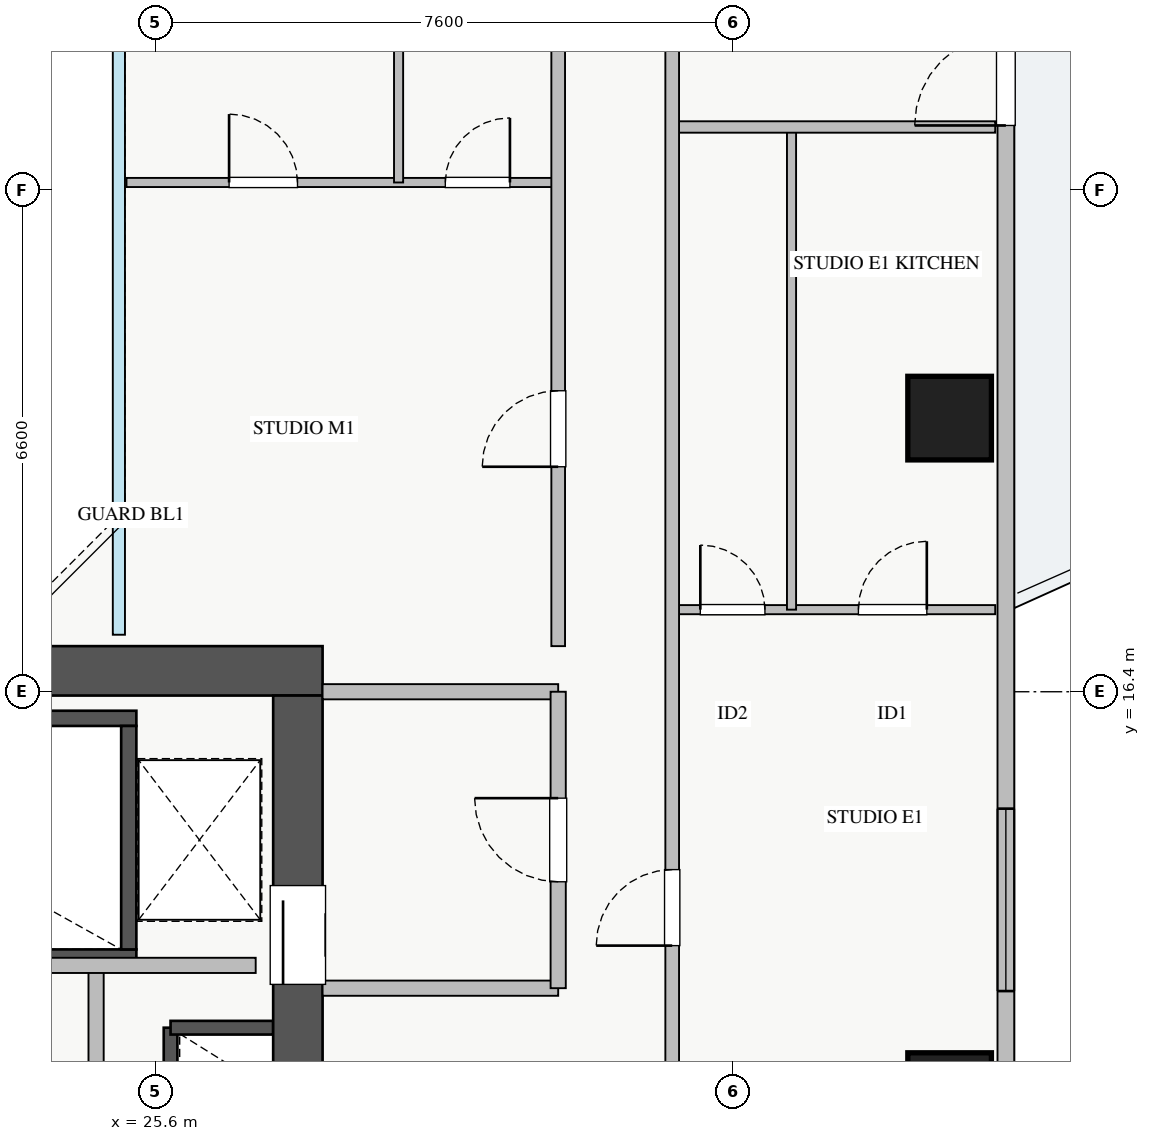
"""IFC4 building model, lengths in metres.
Left out: names, types, materials, properties, quantities, classifications, styles, units other than length and angle.
Written with IfcOpenShell. Run it as: python <this file> out.ifc"""

import sys

from ifc_helpers import new_model, si_unit, direction, frame, frame_2d, origin, origin_2d, place, context, subcontext, project, spatial, rectangle, extrude, source, transform, mapped, element, fill, save


model = new_model("IFC4")
c1 = context("Model", 3, precision=1e-05, world=origin(), true_north=direction((0.0, 1.0)))
c2 = subcontext(c1, "Body", "Model", "MODEL_VIEW")
j1 = project(units=[si_unit("LENGTHUNIT", "METRE"), si_unit("PLANEANGLEUNIT", "RADIAN")], contexts=[c1])
p1 = place(None, origin())
s1 = spatial("IfcSite", under=j1, at=p1, CompositionType="ELEMENT")
p2 = place(p1, origin())
s2 = spatial("IfcBuilding", under=s1, at=p2, CompositionType="ELEMENT")
p3 = place(p2, frame((0.0, 0.0, 132.75)))
s3 = spatial("IfcBuildingStorey", under=s2, at=p3, CompositionType="ELEMENT", Elevation=132.75)
p4 = place(p3, frame((25.8, 10.92, 0.0), z_axis=(0.0, 0.0, 1.0), x_axis=(0.0, 1.0, 0.0)))
e1 = element("IfcWall", 1, at=p4, inside=s3, PredefinedType="SHEAR", context=c2, shape_type="SweptSolid", body=[
    extrude(rectangle(XDim=1.06, YDim=0.18, at=frame_2d((0.53, 0.0))), origin(), (0.0, 0.0, 1.0), 3.07),
])
p5 = place(p3, frame((25.8, 11.98, 0.0), z_axis=(0.0, 0.0, 1.0), x_axis=(1.0, 0.0, 0.0)))
e2 = element("IfcWall", 2, at=p5, inside=s3, PredefinedType="SHEAR", context=c2, shape_type="SweptSolid", body=[
    extrude(rectangle(XDim=1.35, YDim=0.18, at=frame_2d((0.675, 0.0))), origin(), (0.0, 0.0, 1.0), 3.07),
])
p6 = place(p3, frame((18.2, 12.91, 0.0), z_axis=(0.0, 0.0, 1.0), x_axis=(1.0, 0.0, 0.0)))
e3 = element("IfcWall", 3, at=p6, inside=s3, PredefinedType="SHEAR", context=c2, shape_type="SweptSolid", body=[
    extrude(rectangle(XDim=7.15, YDim=0.2, at=frame_2d((3.575, 0.0))), origin(), (0.0, 0.0, 1.0), 3.25),
])
p7 = place(p6, frame((0.35, 0.0, 0.0)))
e4 = element("IfcOpeningElement", 4, at=p7, cuts=e3, PredefinedType="OPENING", context=c2, shape_type="SweptSolid", body=[
    extrude(rectangle(XDim=1.1, YDim=2.05, at=frame_2d((0.55, 1.025))), frame((0.0, 0.11, 0.0), z_axis=(0.0, -1.0, 0.0), x_axis=(1.0, 0.0, 0.0)), (0.0, 0.0, 1.0), 0.22),
])
p8 = place(p3, frame((18.2, 16.05, 0.0), z_axis=(0.0, 0.0, 1.0), x_axis=(1.0, 0.0, 0.0)))
e5 = element("IfcWall", 5, at=p8, inside=s3, PredefinedType="SHEAR", context=c2, shape_type="SweptSolid", body=[
    extrude(rectangle(XDim=7.15, YDim=0.2, at=frame_2d((3.575, 0.0))), origin(), (0.0, 0.0, 1.0), 3.25),
])
p9 = place(p3, frame((25.25, 13.01, 0.0), z_axis=(0.0, 0.0, 1.0), x_axis=(0.0, 1.0, 0.0)))
e6 = element("IfcWall", 6, at=p9, inside=s3, PredefinedType="SHEAR", context=c2, shape_type="SweptSolid", body=[
    extrude(rectangle(XDim=2.94, YDim=0.2, at=frame_2d((1.47, 0.0))), origin(), (0.0, 0.0, 1.0), 3.25),
])
p10 = place(p3, frame((10.2, 16.675, 0.0), z_axis=(0.0, 0.0, 1.0), x_axis=(1.0, 0.0, 0.0)))
e7 = element("IfcWall", 7, at=p10, inside=s3, PredefinedType="SHEAR", context=c2, shape_type="SweptSolid", body=[
    extrude(rectangle(XDim=17.6, YDim=0.65, at=frame_2d((8.8, 0.0))), origin(), (0.0, 0.0, 1.0), 3.25),
])
p11 = place(p3, frame((27.475, 10.45, 0.0), z_axis=(0.0, 0.0, 1.0), x_axis=(0.0, 1.0, 0.0)))
e8 = element("IfcWall", 8, at=p11, inside=s3, PredefinedType="SHEAR", context=c2, shape_type="SweptSolid", body=[
    extrude(rectangle(XDim=5.9, YDim=0.65, at=frame_2d((2.95, 0.0))), origin(), (0.0, 0.0, 1.0), 3.25),
])
p12 = place(p11, frame((2.1, 0.0, 0.0)))
e9 = element("IfcOpeningElement", 9, at=p12, cuts=e8, PredefinedType="OPENING", context=c2, shape_type="SweptSolid", body=[
    extrude(rectangle(XDim=1.3, YDim=2.05, at=frame_2d((0.65, 1.025))), frame((0.0, 0.335, 0.0), z_axis=(0.0, -1.0, 0.0), x_axis=(1.0, 0.0, 0.0)), (0.0, 0.0, 1.0), 0.67),
])
m1 = source(origin(), c2, "Body", "SweptSolid", [
    extrude(rectangle(XDim=1.1, YDim=1.1, at=origin_2d()), origin(), (0.0, 0.0, 1.0), 3.25),
])
for number, where, z_axis, x_axis in (
    (10, (36.05, 11.1, 0.0), (0.0, 0.0, 1.0), (1.0, 0.0, 0.0)),
    (11, (36.05, 20.0, 0.0), (0.0, 0.0, 1.0), (1.0, 0.0, 0.0)),
):
    element("IfcColumn", number, at=place(p3, frame(where, z_axis=z_axis, x_axis=x_axis)), inside=s3, PredefinedType="COLUMN", context=c2, shape_type="MappedRepresentation", body=[
        mapped(m1, transform((0.0, 0.0, 0.0), x_axis=(1.0, 0.0, 0.0), y_axis=(0.0, 1.0, 0.0), z_axis=(0.0, 0.0, 1.0), scale=1.0)),
    ])
p13 = place(p3, frame((36.79, 10.55, 0.0), z_axis=(0.0, 0.0, 1.0), x_axis=(0.0, 1.0, 0.0)))
e12 = element("IfcWall", 12, at=p13, inside=s3, PredefinedType="STANDARD", context=c2, shape_type="SweptSolid", body=[
    extrude(rectangle(XDim=24.9, YDim=0.22, at=frame_2d((12.45, 0.0))), origin(), (0.0, 0.0, 1.0), 2.61),
])
p14 = place(p13, frame((13.3, 0.0, 0.0)))
e13 = element("IfcOpeningElement", 13, at=p14, cuts=e12, PredefinedType="OPENING", context=c2, shape_type="SweptSolid", body=[
    extrude(rectangle(XDim=1.2, YDim=2.1, at=frame_2d((0.6, 1.05))), frame((0.0, 0.12, 0.0), z_axis=(0.0, -1.0, 0.0), x_axis=(1.0, 0.0, 0.0)), (0.0, 0.0, 1.0), 0.24),
])
p15 = place(p13, frame((1.912, 0.0, 0.9)))
e14 = element("IfcOpeningElement", 14, at=p15, cuts=e12, PredefinedType="OPENING", context=c2, shape_type="SweptSolid", body=[
    extrude(rectangle(XDim=2.4, YDim=1.48, at=frame_2d((1.2, 0.74))), frame((0.0, 0.12, 0.0), z_axis=(0.0, -1.0, 0.0), x_axis=(1.0, 0.0, 0.0)), (0.0, 0.0, 1.0), 0.24),
])
p16 = place(p13, frame((20.737, 0.0, 0.9)))
e15 = element("IfcOpeningElement", 15, at=p16, cuts=e12, PredefinedType="OPENING", context=c2, shape_type="SweptSolid", body=[
    extrude(rectangle(XDim=2.1, YDim=1.48, at=frame_2d((1.05, 0.74))), frame((0.0, 0.12, 0.0), z_axis=(0.0, -1.0, 0.0), x_axis=(1.0, 0.0, 0.0)), (0.0, 0.0, 1.0), 0.24),
])
p17 = place(p13, frame((14.72, 0.0, 0.9)))
e16 = element("IfcOpeningElement", 16, at=p17, cuts=e12, PredefinedType="OPENING", context=c2, shape_type="SweptSolid", body=[
    extrude(rectangle(XDim=0.9, YDim=1.2, at=frame_2d((0.45, 0.6))), frame((0.0, 0.12, 0.0), z_axis=(0.0, -1.0, 0.0), x_axis=(1.0, 0.0, 0.0)), (0.0, 0.0, 1.0), 0.24),
])
for number, where, z_axis, x_axis in (
    (17, (27.8, 16.4, 0.0), (0.0, 0.0, 1.0), (1.0, 0.0, 0.0)),
    (18, (27.8, 12.5, 0.0), (0.0, 0.0, 1.0), (1.0, 0.0, 0.0)),
):
    element("IfcWall", number, at=place(p3, frame(where, z_axis=z_axis, x_axis=x_axis)), inside=s3, PredefinedType="PARTITIONING", context=c2, shape_type="SweptSolid", body=[
        extrude(rectangle(XDim=3.1, YDim=0.2, at=frame_2d((1.55, 0.0))), origin(), (0.0, 0.0, 1.0), 3.07),
    ])
p18 = place(p3, frame((30.9, 12.5, 0.0), z_axis=(0.0, 0.0, 1.0), x_axis=(0.0, 1.0, 0.0)))
e19 = element("IfcWall", 19, at=p18, inside=s3, PredefinedType="PARTITIONING", context=c2, shape_type="SweptSolid", body=[
    extrude(rectangle(XDim=3.9, YDim=0.2, at=frame_2d((1.95, 0.0))), origin(), (0.0, 0.0, 1.0), 3.07),
])
p19 = place(p18, frame((1.4, 0.0, 0.0)))
e20 = element("IfcOpeningElement", 20, at=p19, cuts=e19, PredefinedType="OPENING", context=c2, shape_type="SweptSolid", body=[
    extrude(rectangle(XDim=1.1, YDim=2.05, at=frame_2d((0.55, 1.025))), frame((0.0, 0.11, 0.0), z_axis=(0.0, -1.0, 0.0), x_axis=(1.0, 0.0, 0.0)), (0.0, 0.0, 1.0), 0.22),
])
p20 = place(p3, frame((24.82, 10.15, 0.0), z_axis=(0.0, 0.0, 1.0), x_axis=(0.0, 1.0, 0.0)))
e21 = element("IfcWall", 21, at=p20, inside=s3, PredefinedType="PARTITIONING", context=c2, shape_type="SweptSolid", body=[
    extrude(rectangle(XDim=2.65, YDim=0.2, at=frame_2d((1.325, 0.0))), origin(), (0.0, 0.0, 1.0), 3.07),
])
p21 = place(p3, frame((21.75, 12.8, 0.0), z_axis=(0.0, 0.0, 1.0), x_axis=(1.0, 0.0, 0.0)))
e22 = element("IfcWall", 22, at=p21, inside=s3, PredefinedType="PARTITIONING", context=c2, shape_type="SweptSolid", body=[
    extrude(rectangle(XDim=5.17, YDim=0.2, at=frame_2d((2.585, 0.0))), origin(), (0.0, 0.0, 1.0), 3.07),
])
p22 = place(p3, frame((32.4, 17.48, 0.0), z_axis=(0.0, 0.0, 1.0), x_axis=(1.0, 0.0, 0.0)))
e23 = element("IfcWall", 23, at=p22, inside=s3, PredefinedType="PLUMBINGWALL", context=c2, shape_type="SweptSolid", body=[
    extrude(rectangle(XDim=4.25, YDim=0.12, at=frame_2d((2.125, 0.0))), origin(), (0.0, 0.0, 1.0), 3.07),
])
p23 = place(p22, frame((0.37, 0.0, 0.0)))
e24 = element("IfcOpeningElement", 24, at=p23, cuts=e23, PredefinedType="OPENING", context=c2, shape_type="SweptSolid", body=[
    extrude(rectangle(XDim=0.85, YDim=2.05, at=frame_2d((0.425, 1.025))), frame((0.0, 0.07, 0.0), z_axis=(0.0, -1.0, 0.0), x_axis=(1.0, 0.0, 0.0)), (0.0, 0.0, 1.0), 0.14),
])
p24 = place(p22, frame((2.45, 0.0, 0.0)))
e25 = element("IfcOpeningElement", 25, at=p24, cuts=e23, PredefinedType="OPENING", context=c2, shape_type="SweptSolid", body=[
    extrude(rectangle(XDim=0.9, YDim=2.05, at=frame_2d((0.45, 1.025))), frame((0.0, 0.07, 0.0), z_axis=(0.0, -1.0, 0.0), x_axis=(1.0, 0.0, 0.0)), (0.0, 0.0, 1.0), 0.14),
])
p25 = place(p3, frame((33.97, 17.48, 0.0), z_axis=(0.0, 0.0, 1.0), x_axis=(0.0, 1.0, 0.0)))
e26 = element("IfcWall", 26, at=p25, inside=s3, PredefinedType="PLUMBINGWALL", context=c2, shape_type="SweptSolid", body=[
    extrude(rectangle(XDim=6.35, YDim=0.12, at=frame_2d((3.175, 0.0))), origin(), (0.0, 0.0, 1.0), 3.07),
])
p26 = place(p3, frame((32.4, 23.83, 0.0), z_axis=(0.0, 0.0, 1.0), x_axis=(1.0, 0.0, 0.0)))
e27 = element("IfcWall", 27, at=p26, inside=s3, PredefinedType="PARTITIONING", context=c2, shape_type="SweptSolid", body=[
    extrude(rectangle(XDim=4.25, YDim=0.15, at=frame_2d((2.125, 0.0))), origin(), (0.0, 0.0, 1.0), 3.07),
])
p27 = place(p3, frame((32.4, 8.31, 0.0), z_axis=(0.0, 0.0, 1.0), x_axis=(0.0, 1.0, 0.0)))
e28 = element("IfcWall", 28, at=p27, inside=s3, PredefinedType="PARTITIONING", context=c2, shape_type="SweptSolid", body=[
    extrude(rectangle(XDim=29.13, YDim=0.18, at=frame_2d((14.565, 0.0))), origin(), (0.0, 0.0, 1.0), 3.07),
])
p28 = place(p27, frame((27.94, 0.0, 0.0)))
e29 = element("IfcOpeningElement", 29, at=p28, cuts=e28, PredefinedType="OPENING", context=c2, shape_type="SweptSolid", body=[
    extrude(rectangle(XDim=0.9, YDim=2.05, at=frame_2d((0.45, 1.025))), frame((0.0, 0.1, 0.0), z_axis=(0.0, -1.0, 0.0), x_axis=(1.0, 0.0, 0.0)), (0.0, 0.0, 1.0), 0.2),
])
p29 = place(p27, frame((0.415, 0.0, 0.0)))
e30 = element("IfcOpeningElement", 30, at=p29, cuts=e28, PredefinedType="OPENING", context=c2, shape_type="SweptSolid", body=[
    extrude(rectangle(XDim=0.9, YDim=2.05, at=frame_2d((0.45, 1.025))), frame((0.0, 0.1, 0.0), z_axis=(0.0, -1.0, 0.0), x_axis=(1.0, 0.0, 0.0)), (0.0, 0.0, 1.0), 0.2),
])
p30 = place(p27, frame((4.75, 0.0, 0.0)))
e31 = element("IfcOpeningElement", 31, at=p30, cuts=e28, PredefinedType="OPENING", context=c2, shape_type="SweptSolid", body=[
    extrude(rectangle(XDim=1.0, YDim=2.05, at=frame_2d((0.5, 1.025))), frame((0.0, 0.1, 0.0), z_axis=(0.0, -1.0, 0.0), x_axis=(1.0, 0.0, 0.0)), (0.0, 0.0, 1.0), 0.2),
])
p31 = place(p27, frame((18.11, 0.0, 0.0)))
e32 = element("IfcOpeningElement", 32, at=p31, cuts=e28, PredefinedType="OPENING", context=c2, shape_type="SweptSolid", body=[
    extrude(rectangle(XDim=1.0, YDim=2.05, at=frame_2d((0.5, 1.025))), frame((0.0, 0.1, 0.0), z_axis=(0.0, -1.0, 0.0), x_axis=(1.0, 0.0, 0.0)), (0.0, 0.0, 1.0), 0.2),
])
p32 = place(p3, frame((25.22, 23.1, 0.0), z_axis=(0.0, 0.0, 1.0), x_axis=(1.0, 0.0, 0.0)))
e33 = element("IfcWall", 33, at=p32, inside=s3, PredefinedType="PLUMBINGWALL", context=c2, shape_type="SweptSolid", body=[
    extrude(rectangle(XDim=5.68, YDim=0.12, at=frame_2d((2.84, 0.0))), origin(), (0.0, 0.0, 1.0), 3.07),
])
p33 = place(p32, frame((1.35, 0.0, 0.0)))
e34 = element("IfcOpeningElement", 34, at=p33, cuts=e33, PredefinedType="OPENING", context=c2, shape_type="SweptSolid", body=[
    extrude(rectangle(XDim=0.9, YDim=2.05, at=frame_2d((0.45, 1.025))), frame((0.0, 0.07, 0.0), z_axis=(0.0, -1.0, 0.0), x_axis=(1.0, 0.0, 0.0)), (0.0, 0.0, 1.0), 0.14),
])
p34 = place(p32, frame((4.195, 0.0, 0.0)))
e35 = element("IfcOpeningElement", 35, at=p34, cuts=e33, PredefinedType="OPENING", context=c2, shape_type="SweptSolid", body=[
    extrude(rectangle(XDim=0.85, YDim=2.05, at=frame_2d((0.425, 1.025))), frame((0.0, 0.07, 0.0), z_axis=(0.0, -1.0, 0.0), x_axis=(1.0, 0.0, 0.0)), (0.0, 0.0, 1.0), 0.14),
])
p35 = place(p3, frame((28.8, 23.1, 0.0), z_axis=(0.0, 0.0, 1.0), x_axis=(0.0, 1.0, 0.0)))
e36 = element("IfcWall", 36, at=p35, inside=s3, PredefinedType="PLUMBINGWALL", context=c2, shape_type="SweptSolid", body=[
    extrude(rectangle(XDim=5.9, YDim=0.12, at=frame_2d((2.95, 0.0))), origin(), (0.0, 0.0, 1.0), 3.07),
])
p36 = place(p3, frame((30.9, 17.0, 0.0), z_axis=(0.0, 0.0, 1.0), x_axis=(0.0, 1.0, 0.0)))
e37 = element("IfcWall", 37, at=p36, inside=s3, PredefinedType="PARTITIONING", context=c2, shape_type="SweptSolid", body=[
    extrude(rectangle(XDim=12.0, YDim=0.18, at=frame_2d((6.0, 0.0))), origin(), (0.0, 0.0, 1.0), 3.07),
])
p37 = place(p36, frame((2.36, 0.0, 0.0)))
e38 = element("IfcOpeningElement", 38, at=p37, cuts=e37, PredefinedType="OPENING", context=c2, shape_type="SweptSolid", body=[
    extrude(rectangle(XDim=1.0, YDim=2.05, at=frame_2d((0.5, 1.025))), frame((0.0, 0.1, 0.0), z_axis=(0.0, -1.0, 0.0), x_axis=(1.0, 0.0, 0.0)), (0.0, 0.0, 1.0), 0.2),
])
m2 = source(origin(), c2, "Body", "SweptSolid", [
    extrude(rectangle(XDim=1.2, YDim=2.1, at=frame_2d((0.6, 1.05))), frame((0.0, 0.025, 0.0), z_axis=(0.0, -1.0, 0.0), x_axis=(1.0, 0.0, 0.0)), (0.0, 0.0, 1.0), 0.05),
])
p38 = place(p14, origin())
e39 = element("IfcDoor", 39, at=p38, inside=s3, OperationType="SINGLE_SWING_LEFT", PredefinedType="DOOR", context=c2, shape_type="MappedRepresentation", body=[
    mapped(m2, transform((0.0, 0.0, 0.0), x_axis=(1.0, 0.0, 0.0), y_axis=(0.0, 1.0, 0.0), z_axis=(0.0, 0.0, 1.0), scale=1.0)),
])
fill(e13, e39)
m3 = source(origin(), c2, "Body", "SweptSolid", [
    extrude(rectangle(XDim=2.4, YDim=1.48, at=frame_2d((1.2, 0.74))), frame((0.0, 0.03, 0.0), z_axis=(0.0, -1.0, 0.0), x_axis=(1.0, 0.0, 0.0)), (0.0, 0.0, 1.0), 0.06),
])
p39 = place(p15, origin())
e40 = element("IfcWindow", 40, at=p39, inside=s3, PartitioningType="TRIPLE_PANEL_VERTICAL", PredefinedType="WINDOW", context=c2, shape_type="MappedRepresentation", body=[
    mapped(m3, transform((0.0, 0.0, 0.0), x_axis=(1.0, 0.0, 0.0), y_axis=(0.0, 1.0, 0.0), z_axis=(0.0, 0.0, 1.0), scale=1.0)),
])
fill(e14, e40)
m4 = source(origin(), c2, "Body", "SweptSolid", [
    extrude(rectangle(XDim=1.3, YDim=2.05, at=frame_2d((0.65, 1.025))), frame((0.0, 0.025, 0.0), z_axis=(0.0, -1.0, 0.0), x_axis=(1.0, 0.0, 0.0)), (0.0, 0.0, 1.0), 0.05),
])
p40 = place(p12, origin())
e41 = element("IfcDoor", 41, at=p40, inside=s3, OperationType="SLIDING_TO_RIGHT", PredefinedType="DOOR", context=c2, shape_type="MappedRepresentation", body=[
    mapped(m4, transform((0.0, 0.0, 0.0), x_axis=(1.0, 0.0, 0.0), y_axis=(0.0, 1.0, 0.0), z_axis=(0.0, 0.0, 1.0), scale=1.0)),
])
fill(e9, e41)
m5 = source(origin(), c2, "Body", "SweptSolid", [
    extrude(rectangle(XDim=1.1, YDim=2.05, at=frame_2d((0.55, 1.025))), frame((0.0, 0.025, 0.0), z_axis=(0.0, -1.0, 0.0), x_axis=(1.0, 0.0, 0.0)), (0.0, 0.0, 1.0), 0.05),
])
p41 = place(p19, origin())
e42 = element("IfcDoor", 42, at=p41, inside=s3, OperationType="SINGLE_SWING_RIGHT", PredefinedType="DOOR", context=c2, shape_type="MappedRepresentation", body=[
    mapped(m5, transform((0.0, 0.0, 0.0), x_axis=(1.0, 0.0, 0.0), y_axis=(0.0, 1.0, 0.0), z_axis=(0.0, 0.0, 1.0), scale=1.0)),
])
fill(e20, e42)
m6 = source(origin(), c2, "Body", "SweptSolid", [
    extrude(rectangle(XDim=0.85, YDim=2.05, at=frame_2d((0.425, 1.025))), frame((0.0, 0.025, 0.0), z_axis=(0.0, -1.0, 0.0), x_axis=(1.0, 0.0, 0.0)), (0.0, 0.0, 1.0), 0.05),
])
p42 = place(p23, origin())
e43 = element("IfcDoor", 43, at=p42, inside=s3, OperationType="SINGLE_SWING_LEFT", PredefinedType="DOOR", context=c2, shape_type="MappedRepresentation", body=[
    mapped(m6, transform((0.0, 0.0, 0.0), x_axis=(1.0, 0.0, 0.0), y_axis=(0.0, 1.0, 0.0), z_axis=(0.0, 0.0, 1.0), scale=1.0)),
])
fill(e24, e43)
m7 = source(origin(), c2, "Body", "SweptSolid", [
    extrude(rectangle(XDim=0.9, YDim=2.05, at=frame_2d((0.45, 1.025))), frame((0.0, 0.025, 0.0), z_axis=(0.0, -1.0, 0.0), x_axis=(1.0, 0.0, 0.0)), (0.0, 0.0, 1.0), 0.05),
])
p43 = place(p24, origin())
e44 = element("IfcDoor", 44, at=p43, inside=s3, OperationType="SINGLE_SWING_RIGHT", PredefinedType="DOOR", context=c2, shape_type="MappedRepresentation", body=[
    mapped(m7, transform((0.0, 0.0, 0.0), x_axis=(1.0, 0.0, 0.0), y_axis=(0.0, 1.0, 0.0), z_axis=(0.0, 0.0, 1.0), scale=1.0)),
])
fill(e25, e44)
m8 = source(origin(), c2, "Body", "SweptSolid", [
    extrude(rectangle(XDim=1.0, YDim=2.05, at=frame_2d((0.5, 1.025))), frame((0.0, 0.025, 0.0), z_axis=(0.0, -1.0, 0.0), x_axis=(1.0, 0.0, 0.0)), (0.0, 0.0, 1.0), 0.05),
])
p44 = place(p30, origin())
e45 = element("IfcDoor", 45, at=p44, inside=s3, OperationType="SINGLE_SWING_LEFT", PredefinedType="DOOR", context=c2, shape_type="MappedRepresentation", body=[
    mapped(m8, transform((0.0, 0.0, 0.0), x_axis=(1.0, 0.0, 0.0), y_axis=(0.0, 1.0, 0.0), z_axis=(0.0, 0.0, 1.0), scale=1.0)),
])
fill(e31, e45)
p45 = place(p33, origin())
e46 = element("IfcDoor", 46, at=p45, inside=s3, OperationType="SINGLE_SWING_LEFT", PredefinedType="DOOR", context=c2, shape_type="MappedRepresentation", body=[
    mapped(m7, transform((0.0, 0.0, 0.0), x_axis=(1.0, 0.0, 0.0), y_axis=(0.0, 1.0, 0.0), z_axis=(0.0, 0.0, 1.0), scale=1.0)),
])
fill(e34, e46)
p46 = place(p34, origin())
e47 = element("IfcDoor", 47, at=p46, inside=s3, OperationType="SINGLE_SWING_RIGHT", PredefinedType="DOOR", context=c2, shape_type="MappedRepresentation", body=[
    mapped(m6, transform((0.0, 0.0, 0.0), x_axis=(1.0, 0.0, 0.0), y_axis=(0.0, 1.0, 0.0), z_axis=(0.0, 0.0, 1.0), scale=1.0)),
])
fill(e35, e47)
p47 = place(p37, origin())
e48 = element("IfcDoor", 48, at=p47, inside=s3, OperationType="SINGLE_SWING_LEFT", PredefinedType="DOOR", context=c2, shape_type="MappedRepresentation", body=[
    mapped(m8, transform((0.0, 0.0, 0.0), x_axis=(1.0, 0.0, 0.0), y_axis=(0.0, 1.0, 0.0), z_axis=(0.0, 0.0, 1.0), scale=1.0)),
])
fill(e38, e48)
save(model, sys.argv[1])
